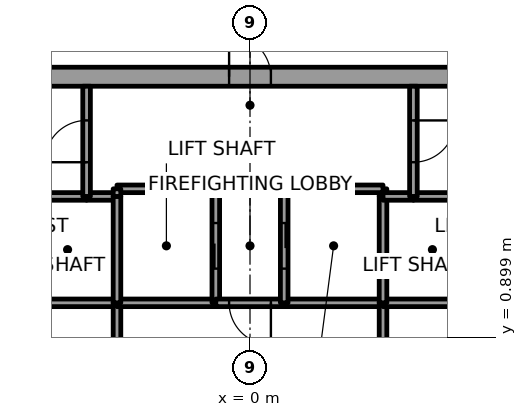
"""IFC4 building model, lengths in metres.
Left out: names, types, materials, properties, quantities, classifications, styles, units other than length and angle.
Written with IfcOpenShell. Run it as: python <this file> out.ifc"""

import sys

from ifc_helpers import new_model, si_unit, direction, frame, frame_2d, origin, place, context, subcontext, project, spatial, rectangle, extrude, element, fill, save


model = new_model("IFC4")
c1 = context("Model", 3, precision=1e-05, world=origin(), true_north=direction((0.0, 1.0)))
c2 = subcontext(c1, "Body", "Model", "MODEL_VIEW")
j1 = project(units=[si_unit("LENGTHUNIT", "METRE"), si_unit("PLANEANGLEUNIT", "RADIAN")], contexts=[c1])
p1 = place(None, origin())
s1 = spatial("IfcSite", under=j1, at=p1, CompositionType="ELEMENT")
p2 = place(p1, origin())
s2 = spatial("IfcBuilding", under=s1, at=p2, CompositionType="ELEMENT")
p3 = place(p2, frame((0.0, 0.0, 70.2)))
s3 = spatial("IfcBuildingStorey", under=s2, at=p3, CompositionType="ELEMENT", Elevation=70.2)
p4 = place(p3, frame((-11.0, 7.75, 0.0), z_axis=(0.0, 0.0, 1.0), x_axis=(1.0, 0.0, 0.0)))
e1 = element("IfcWall", 1, at=p4, inside=s3, PredefinedType="SHEAR", context=c2, shape_type="SweptSolid", body=[
    extrude(rectangle(XDim=22.0, YDim=0.5, at=frame_2d((11.0, 0.0))), origin(), (0.0, 0.0, 1.0), 3.7),
])
p5 = place(p4, frame((10.45, 0.0, 0.0)))
e2 = element("IfcOpeningElement", 2, at=p5, cuts=e1, PredefinedType="OPENING", context=c2, shape_type="SweptSolid", body=[
    extrude(rectangle(XDim=1.1, YDim=2.1, at=frame_2d((0.55, 1.05))), frame((0.0, 0.25, 0.0), z_axis=(0.0, -1.0, 0.0), x_axis=(1.0, 0.0, 0.0)), (0.0, 0.0, 1.0), 0.5),
])
p6 = place(p3, frame((-3.5, 1.8, 0.0), z_axis=(0.0, 0.0, 1.0), x_axis=(-1.0, 0.0, 0.0)))
e3 = element("IfcWall", 3, at=p6, inside=s3, PredefinedType="SOLIDWALL", context=c2, shape_type="SweptSolid", body=[
    extrude(rectangle(XDim=2.6, YDim=0.2, at=frame_2d((1.3, 0.0))), origin(), (0.0, 0.0, 1.0), 3.55),
])
p7 = place(p3, frame((-4.3, 4.6, 0.0), z_axis=(0.0, 0.0, 1.0), x_axis=(-1.0, 0.0, 0.0)))
e4 = element("IfcWall", 4, at=p7, inside=s3, PredefinedType="SOLIDWALL", context=c2, shape_type="SweptSolid", body=[
    extrude(rectangle(XDim=1.8, YDim=0.2, at=frame_2d((0.9, 0.0))), origin(), (0.0, 0.0, 1.0), 3.55),
])
p8 = place(p3, frame((-3.5, 4.6, 0.0), z_axis=(0.0, 0.0, 1.0), x_axis=(-1.0, 0.0, 0.0)))
e5 = element("IfcWall", 5, at=p8, inside=s3, PredefinedType="SOLIDWALL", context=c2, shape_type="SweptSolid", body=[
    extrude(rectangle(XDim=0.8, YDim=0.2, at=frame_2d((0.4, 0.0))), origin(), (0.0, 0.0, 1.0), 3.55),
])
p9 = place(p3, frame((-4.3, 4.6, 0.0), z_axis=(0.0, 0.0, 1.0), x_axis=(0.0, 1.0, 0.0)))
e6 = element("IfcWall", 6, at=p9, inside=s3, PredefinedType="SOLIDWALL", context=c2, shape_type="SweptSolid", body=[
    extrude(rectangle(XDim=2.9, YDim=0.2, at=frame_2d((1.45, 0.0))), origin(), (0.0, 0.0, 1.0), 3.55),
])
p10 = place(p9, frame((0.9, 0.0, 0.0)))
e7 = element("IfcOpeningElement", 7, at=p10, cuts=e6, PredefinedType="OPENING", context=c2, shape_type="SweptSolid", body=[
    extrude(rectangle(XDim=1.1, YDim=2.1, at=frame_2d((0.55, 1.05))), frame((0.0, 0.1, 0.0), z_axis=(0.0, -1.0, 0.0), x_axis=(1.0, 0.0, 0.0)), (0.0, 0.0, 1.0), 0.2),
])
p11 = place(p3, frame((-3.5, 1.8, 0.0), z_axis=(0.0, 0.0, 1.0), x_axis=(0.0, -1.0, 0.0)))
e8 = element("IfcWall", 8, at=p11, inside=s3, PredefinedType="SOLIDWALL", context=c2, shape_type="SweptSolid", body=[
    extrude(rectangle(XDim=3.6, YDim=0.2, at=frame_2d((1.8, 0.0))), origin(), (0.0, 0.0, 1.0), 3.55),
])
p12 = place(p11, frame((1.05, 0.0, 0.0)))
e9 = element("IfcOpeningElement", 9, at=p12, cuts=e8, PredefinedType="OPENING", context=c2, shape_type="SweptSolid", body=[
    extrude(rectangle(XDim=1.5, YDim=2.1, at=frame_2d((0.75, 1.05))), frame((0.0, 0.1, 0.0), z_axis=(0.0, -1.0, 0.0), x_axis=(1.0, 0.0, 0.0)), (0.0, 0.0, 1.0), 0.2),
])
p13 = place(p3, frame((-0.9, 1.8, 0.0), z_axis=(0.0, 0.0, 1.0), x_axis=(-1.0, 0.0, 0.0)))
e10 = element("IfcWall", 10, at=p13, inside=s3, PredefinedType="SOLIDWALL", context=c2, shape_type="SweptSolid", body=[
    extrude(rectangle(XDim=2.6, YDim=0.2, at=frame_2d((1.3, 0.0))), origin(), (0.0, 0.0, 1.0), 3.55),
])
p14 = place(p3, frame((-3.5, 4.6, 0.0), z_axis=(0.0, 0.0, 1.0), x_axis=(0.0, -1.0, 0.0)))
e11 = element("IfcWall", 11, at=p14, inside=s3, PredefinedType="SOLIDWALL", context=c2, shape_type="SweptSolid", body=[
    extrude(rectangle(XDim=2.8, YDim=0.2, at=frame_2d((1.4, 0.0))), origin(), (0.0, 0.0, 1.0), 3.55),
])
p15 = place(p3, frame((-0.9, 1.8, 0.0), z_axis=(0.0, 0.0, 1.0), x_axis=(0.0, 1.0, 0.0)))
e12 = element("IfcWall", 12, at=p15, inside=s3, PredefinedType="SOLIDWALL", context=c2, shape_type="SweptSolid", body=[
    extrude(rectangle(XDim=3.0, YDim=0.2, at=frame_2d((1.5, 0.0))), origin(), (0.0, 0.0, 1.0), 3.55),
])
p16 = place(p15, frame((0.9, 0.0, 0.0)))
e13 = element("IfcOpeningElement", 13, at=p16, cuts=e12, PredefinedType="OPENING", context=c2, shape_type="SweptSolid", body=[
    extrude(rectangle(XDim=1.2, YDim=2.1, at=frame_2d((0.6, 1.05))), frame((0.0, 0.1, 0.0), z_axis=(0.0, -1.0, 0.0), x_axis=(1.0, 0.0, 0.0)), (0.0, 0.0, 1.0), 0.2),
])
p17 = place(p3, frame((-0.9, 4.8, 0.0), z_axis=(0.0, 0.0, 1.0), x_axis=(-1.0, 0.0, 0.0)))
e14 = element("IfcWall", 14, at=p17, inside=s3, PredefinedType="SOLIDWALL", context=c2, shape_type="SweptSolid", body=[
    extrude(rectangle(XDim=2.6, YDim=0.2, at=frame_2d((1.3, 0.0))), origin(), (0.0, 0.0, 1.0), 3.55),
])
p18 = place(p3, frame((-3.5, 4.8, 0.0), z_axis=(0.0, 0.0, 1.0), x_axis=(0.0, -1.0, 0.0)))
e15 = element("IfcWall", 15, at=p18, inside=s3, PredefinedType="SOLIDWALL", context=c2, shape_type="SweptSolid", body=[
    extrude(rectangle(XDim=0.2, YDim=0.2, at=frame_2d((0.1, 0.0))), origin(), (0.0, 0.0, 1.0), 3.55),
])
p19 = place(p3, frame((0.9, 1.8, 0.0), z_axis=(0.0, 0.0, 1.0), x_axis=(-1.0, 0.0, 0.0)))
e16 = element("IfcWall", 16, at=p19, inside=s3, PredefinedType="SOLIDWALL", context=c2, shape_type="SweptSolid", body=[
    extrude(rectangle(XDim=1.8, YDim=0.2, at=frame_2d((0.9, 0.0))), origin(), (0.0, 0.0, 1.0), 3.55),
])
p20 = place(p19, frame((0.35, 0.0, 0.0)))
e17 = element("IfcOpeningElement", 17, at=p20, cuts=e16, PredefinedType="OPENING", context=c2, shape_type="SweptSolid", body=[
    extrude(rectangle(XDim=1.1, YDim=2.1, at=frame_2d((0.55, 1.05))), frame((0.0, 0.1, 0.0), z_axis=(0.0, -1.0, 0.0), x_axis=(1.0, 0.0, 0.0)), (0.0, 0.0, 1.0), 0.2),
])
p21 = place(p3, frame((3.5, 1.8, 0.0), z_axis=(0.0, 0.0, 1.0), x_axis=(-1.0, 0.0, 0.0)))
e18 = element("IfcWall", 18, at=p21, inside=s3, PredefinedType="SOLIDWALL", context=c2, shape_type="SweptSolid", body=[
    extrude(rectangle(XDim=2.6, YDim=0.2, at=frame_2d((1.3, 0.0))), origin(), (0.0, 0.0, 1.0), 3.55),
])
p22 = place(p3, frame((3.5, 4.6, 0.0), z_axis=(0.0, 0.0, 1.0), x_axis=(0.0, 1.0, 0.0)))
e19 = element("IfcWall", 19, at=p22, inside=s3, PredefinedType="SOLIDWALL", context=c2, shape_type="SweptSolid", body=[
    extrude(rectangle(XDim=0.2, YDim=0.2, at=frame_2d((0.1, 0.0))), origin(), (0.0, 0.0, 1.0), 3.55),
])
p23 = place(p3, frame((3.5, 4.8, 0.0), z_axis=(0.0, 0.0, 1.0), x_axis=(-1.0, 0.0, 0.0)))
e20 = element("IfcWall", 20, at=p23, inside=s3, PredefinedType="SOLIDWALL", context=c2, shape_type="SweptSolid", body=[
    extrude(rectangle(XDim=2.6, YDim=0.2, at=frame_2d((1.3, 0.0))), origin(), (0.0, 0.0, 1.0), 3.55),
])
p24 = place(p3, frame((0.9, 4.8, 0.0), z_axis=(0.0, 0.0, 1.0), x_axis=(0.0, -1.0, 0.0)))
e21 = element("IfcWall", 21, at=p24, inside=s3, PredefinedType="SOLIDWALL", context=c2, shape_type="SweptSolid", body=[
    extrude(rectangle(XDim=3.0, YDim=0.2, at=frame_2d((1.5, 0.0))), origin(), (0.0, 0.0, 1.0), 3.55),
])
p25 = place(p24, frame((0.9, 0.0, 0.0)))
e22 = element("IfcOpeningElement", 22, at=p25, cuts=e21, PredefinedType="OPENING", context=c2, shape_type="SweptSolid", body=[
    extrude(rectangle(XDim=1.2, YDim=2.1, at=frame_2d((0.6, 1.05))), frame((0.0, 0.1, 0.0), z_axis=(0.0, -1.0, 0.0), x_axis=(1.0, 0.0, 0.0)), (0.0, 0.0, 1.0), 0.2),
])
p26 = place(p3, frame((3.5, -1.8, 0.0), z_axis=(0.0, 0.0, 1.0), x_axis=(0.0, 1.0, 0.0)))
e23 = element("IfcWall", 23, at=p26, inside=s3, PredefinedType="SOLIDWALL", context=c2, shape_type="SweptSolid", body=[
    extrude(rectangle(XDim=3.6, YDim=0.2, at=frame_2d((1.8, 0.0))), origin(), (0.0, 0.0, 1.0), 3.55),
])
p27 = place(p26, frame((1.05, 0.0, 0.0)))
e24 = element("IfcOpeningElement", 24, at=p27, cuts=e23, PredefinedType="OPENING", context=c2, shape_type="SweptSolid", body=[
    extrude(rectangle(XDim=1.5, YDim=2.1, at=frame_2d((0.75, 1.05))), frame((0.0, 0.1, 0.0), z_axis=(0.0, -1.0, 0.0), x_axis=(1.0, 0.0, 0.0)), (0.0, 0.0, 1.0), 0.2),
])
p28 = place(p3, frame((6.1, 1.8, 0.0), z_axis=(0.0, 0.0, 1.0), x_axis=(-1.0, 0.0, 0.0)))
e25 = element("IfcWall", 25, at=p28, inside=s3, PredefinedType="SOLIDWALL", context=c2, shape_type="SweptSolid", body=[
    extrude(rectangle(XDim=2.6, YDim=0.2, at=frame_2d((1.3, 0.0))), origin(), (0.0, 0.0, 1.0), 3.55),
])
p29 = place(p3, frame((3.5, 1.8, 0.0), z_axis=(0.0, 0.0, 1.0), x_axis=(0.0, 1.0, 0.0)))
e26 = element("IfcWall", 26, at=p29, inside=s3, PredefinedType="SOLIDWALL", context=c2, shape_type="SweptSolid", body=[
    extrude(rectangle(XDim=2.8, YDim=0.2, at=frame_2d((1.4, 0.0))), origin(), (0.0, 0.0, 1.0), 3.55),
])
p30 = place(p3, frame((4.3, 4.6, 0.0), z_axis=(0.0, 0.0, 1.0), x_axis=(-1.0, 0.0, 0.0)))
e27 = element("IfcWall", 27, at=p30, inside=s3, PredefinedType="SOLIDWALL", context=c2, shape_type="SweptSolid", body=[
    extrude(rectangle(XDim=0.8, YDim=0.2, at=frame_2d((0.4, 0.0))), origin(), (0.0, 0.0, 1.0), 3.55),
])
p31 = place(p3, frame((6.1, 4.6, 0.0), z_axis=(0.0, 0.0, 1.0), x_axis=(-1.0, 0.0, 0.0)))
e28 = element("IfcWall", 28, at=p31, inside=s3, PredefinedType="SOLIDWALL", context=c2, shape_type="SweptSolid", body=[
    extrude(rectangle(XDim=1.8, YDim=0.2, at=frame_2d((0.9, 0.0))), origin(), (0.0, 0.0, 1.0), 3.55),
])
p32 = place(p3, frame((4.3, 7.5, 0.0), z_axis=(0.0, 0.0, 1.0), x_axis=(0.0, -1.0, 0.0)))
e29 = element("IfcWall", 29, at=p32, inside=s3, PredefinedType="SOLIDWALL", context=c2, shape_type="SweptSolid", body=[
    extrude(rectangle(XDim=2.9, YDim=0.2, at=frame_2d((1.45, 0.0))), origin(), (0.0, 0.0, 1.0), 3.55),
])
p33 = place(p32, frame((0.9, 0.0, 0.0)))
e30 = element("IfcOpeningElement", 30, at=p33, cuts=e29, PredefinedType="OPENING", context=c2, shape_type="SweptSolid", body=[
    extrude(rectangle(XDim=1.1, YDim=2.1, at=frame_2d((0.55, 1.05))), frame((0.0, 0.1, 0.0), z_axis=(0.0, -1.0, 0.0), x_axis=(1.0, 0.0, 0.0)), (0.0, 0.0, 1.0), 0.2),
])
p34 = place(p16, origin())
e31 = element("IfcDoor", 31, at=p34, inside=s3, OperationType="SLIDING_TO_LEFT", PredefinedType="DOOR", context=c2, shape_type="SweptSolid", body=[
    extrude(rectangle(XDim=1.2, YDim=2.1, at=frame_2d((0.6, 1.05))), frame((0.0, 0.025, 0.0), z_axis=(0.0, -1.0, 0.0), x_axis=(1.0, 0.0, 0.0)), (0.0, 0.0, 1.0), 0.05),
])
fill(e13, e31)
p35 = place(p25, origin())
e32 = element("IfcDoor", 32, at=p35, inside=s3, OperationType="SLIDING_TO_RIGHT", PredefinedType="DOOR", context=c2, shape_type="SweptSolid", body=[
    extrude(rectangle(XDim=1.2, YDim=2.1, at=frame_2d((0.6, 1.05))), frame((0.0, 0.025, 0.0), z_axis=(0.0, -1.0, 0.0), x_axis=(1.0, 0.0, 0.0)), (0.0, 0.0, 1.0), 0.05),
])
fill(e22, e32)
p36 = place(p20, origin())
e33 = element("IfcDoor", 33, at=p36, inside=s3, OperationType="SINGLE_SWING_RIGHT", PredefinedType="DOOR", context=c2, shape_type="SweptSolid", body=[
    extrude(rectangle(XDim=1.1, YDim=2.1, at=frame_2d((0.55, 1.05))), frame((0.0, 0.025, 0.0), z_axis=(0.0, -1.0, 0.0), x_axis=(1.0, 0.0, 0.0)), (0.0, 0.0, 1.0), 0.05),
])
fill(e17, e33)
p37 = place(p10, origin())
e34 = element("IfcDoor", 34, at=p37, inside=s3, OperationType="SINGLE_SWING_LEFT", PredefinedType="DOOR", context=c2, shape_type="SweptSolid", body=[
    extrude(rectangle(XDim=1.1, YDim=2.1, at=frame_2d((0.55, 1.05))), frame((0.0, 0.025, 0.0), z_axis=(0.0, -1.0, 0.0), x_axis=(1.0, 0.0, 0.0)), (0.0, 0.0, 1.0), 0.05),
])
fill(e7, e34)
p38 = place(p33, origin())
e35 = element("IfcDoor", 35, at=p38, inside=s3, OperationType="SINGLE_SWING_RIGHT", PredefinedType="DOOR", context=c2, shape_type="SweptSolid", body=[
    extrude(rectangle(XDim=1.1, YDim=2.1, at=frame_2d((0.55, 1.05))), frame((0.0, 0.025, 0.0), z_axis=(0.0, -1.0, 0.0), x_axis=(1.0, 0.0, 0.0)), (0.0, 0.0, 1.0), 0.05),
])
fill(e30, e35)
p39 = place(p5, origin())
e36 = element("IfcDoor", 36, at=p39, inside=s3, OperationType="SINGLE_SWING_RIGHT", PredefinedType="DOOR", context=c2, shape_type="SweptSolid", body=[
    extrude(rectangle(XDim=1.1, YDim=2.1, at=frame_2d((0.55, 1.05))), frame((0.0, 0.025, 0.0), z_axis=(0.0, -1.0, 0.0), x_axis=(1.0, 0.0, 0.0)), (0.0, 0.0, 1.0), 0.05),
])
fill(e2, e36)
save(model, sys.argv[1])
